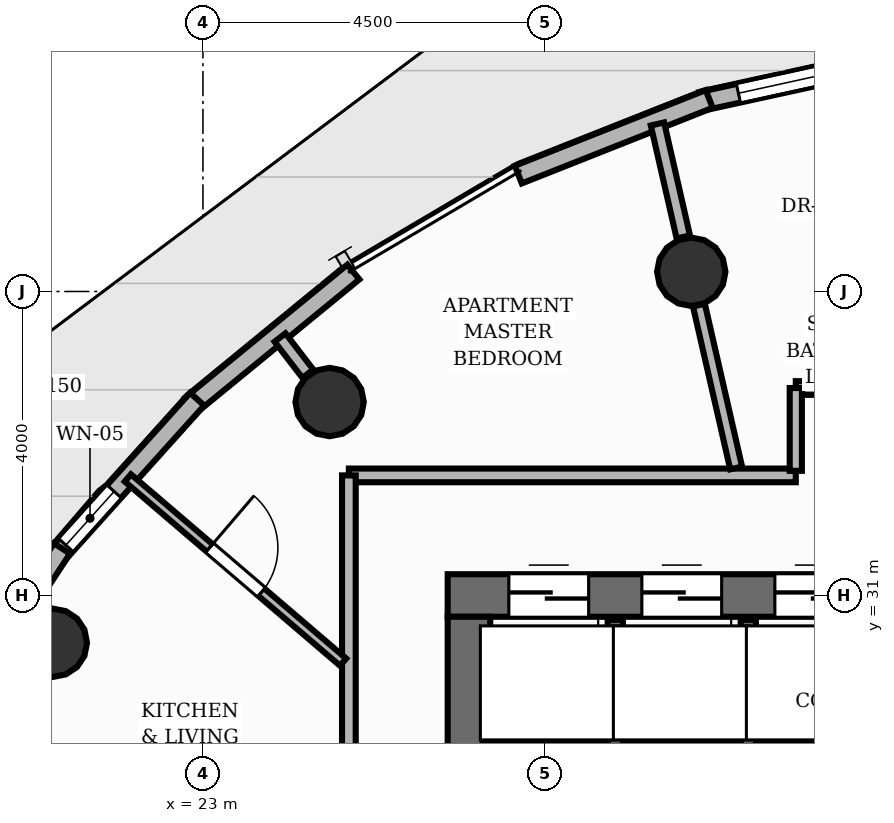
"""IFC4 building model, lengths in metres.
Left out: names, types, materials, properties, quantities, classifications, styles, units other than length and angle.
Written with IfcOpenShell. Run it as: python <this file> out.ifc"""

import sys

from ifc_helpers import new_model, si_unit, direction, frame, frame_2d, origin, origin_2d, place, context, subcontext, project, spatial, rectangle, circle, extrude, element, fill, save


model = new_model("IFC4")
c1 = context("Model", 3, precision=1e-05, world=origin(), true_north=direction((0.0, 1.0)))
c2 = subcontext(c1, "Body", "Model", "MODEL_VIEW")
j1 = project(units=[si_unit("LENGTHUNIT", "METRE"), si_unit("PLANEANGLEUNIT", "RADIAN")], contexts=[c1])
p1 = place(None, origin())
s1 = spatial("IfcSite", under=j1, at=p1, CompositionType="ELEMENT")
p2 = place(p1, origin())
s2 = spatial("IfcBuilding", under=s1, at=p2, CompositionType="ELEMENT")
p3 = place(p2, frame((0.0, 0.0, 179.04)))
s3 = spatial("IfcBuildingStorey", under=s2, at=p3, CompositionType="ELEMENT", Elevation=179.04)
p4 = place(p3, frame((26.22, 31.0, 0.0), z_axis=(0.0, 0.0, 1.0), x_axis=(1.0, 0.0, 0.0)))
e1 = element("IfcWall", 1, at=p4, inside=s3, PredefinedType="SHEAR", context=c2, shape_type="SweptSolid", body=[
    extrude(rectangle(XDim=11.56, YDim=0.56, at=frame_2d((5.78, 0.0))), origin(), (0.0, 0.0, 1.0), 3.2),
])
p5 = place(p4, frame((8.18, 0.0, 0.0)))
e2 = element("IfcOpeningElement", 2, at=p5, cuts=e1, PredefinedType="OPENING", context=c2, shape_type="SweptSolid", body=[
    extrude(rectangle(XDim=1.1, YDim=2.15, at=frame_2d((0.55, 1.075))), frame((0.0, 0.29, 0.0), z_axis=(0.0, -1.0, 0.0), x_axis=(1.0, 0.0, 0.0)), (0.0, 0.0, 1.0), 0.58),
])
p6 = place(p4, frame((0.805, 0.0, 0.0)))
e3 = element("IfcOpeningElement", 3, at=p6, cuts=e1, PredefinedType="OPENING", context=c2, shape_type="SweptSolid", body=[
    extrude(rectangle(XDim=1.05, YDim=2.15, at=frame_2d((0.525, 1.075))), frame((0.0, 0.29, 0.0), z_axis=(0.0, -1.0, 0.0), x_axis=(1.0, 0.0, 0.0)), (0.0, 0.0, 1.0), 0.58),
])
p7 = place(p4, frame((2.555, 0.0, 0.0)))
e4 = element("IfcOpeningElement", 4, at=p7, cuts=e1, PredefinedType="OPENING", context=c2, shape_type="SweptSolid", body=[
    extrude(rectangle(XDim=1.05, YDim=2.15, at=frame_2d((0.525, 1.075))), frame((0.0, 0.29, 0.0), z_axis=(0.0, -1.0, 0.0), x_axis=(1.0, 0.0, 0.0)), (0.0, 0.0, 1.0), 0.58),
])
p8 = place(p4, frame((4.305, 0.0, 0.0)))
e5 = element("IfcOpeningElement", 5, at=p8, cuts=e1, PredefinedType="OPENING", context=c2, shape_type="SweptSolid", body=[
    extrude(rectangle(XDim=1.05, YDim=2.15, at=frame_2d((0.525, 1.075))), frame((0.0, 0.29, 0.0), z_axis=(0.0, -1.0, 0.0), x_axis=(1.0, 0.0, 0.0)), (0.0, 0.0, 1.0), 0.58),
])
p9 = place(p3, frame((26.5, 17.28, 0.0), z_axis=(0.0, 0.0, 1.0), x_axis=(0.0, 1.0, 0.0)))
e6 = element("IfcWall", 6, at=p9, inside=s3, PredefinedType="SHEAR", context=c2, shape_type="SweptSolid", body=[
    extrude(rectangle(XDim=13.44, YDim=0.56, at=frame_2d((6.72, 0.0))), origin(), (0.0, 0.0, 1.0), 3.2),
])
for number, where, z_axis, x_axis in (
    (7, (29.425, 35.26, 0.0), (0.0, 0.0, 1.0), (1.0, 0.0, 0.0)),
    (8, (24.667, 33.545, 0.0), (0.0, 0.0, 1.0), (1.0, 0.0, 0.0)),
    (9, (21.025, 30.378, 0.0), (0.0, 0.0, 1.0), (1.0, 0.0, 0.0)),
):
    element("IfcColumn", number, at=place(p3, frame(where, z_axis=z_axis, x_axis=x_axis)), inside=s3, PredefinedType="COLUMN", context=c2, shape_type="SweptSolid", body=[
        extrude(circle(Radius=0.45, at=origin_2d()), origin(), (0.0, 0.0, 1.0), 3.2),
    ])
p10 = place(p3, frame((29.556, 37.501, 0.0), z_axis=(0.0, 0.0, 1.0), x_axis=(0.976886196324, 0.213760051067, 0.0)))
e10 = element("IfcWall", 10, at=p10, inside=s3, PredefinedType="SOLIDWALL", context=c2, shape_type="SweptSolid", body=[
    extrude(rectangle(XDim=2.651, YDim=0.25, at=frame_2d((1.325, 0.0))), origin(), (0.0, 0.0, 1.0), 2.96),
])
p11 = place(p10, frame((0.501, 0.0, 0.85)))
e11 = element("IfcOpeningElement", 11, at=p11, cuts=e10, PredefinedType="OPENING", context=c2, shape_type="SweptSolid", body=[
    extrude(rectangle(XDim=1.65, YDim=1.55, at=frame_2d((0.825, 0.775))), frame((0.0, 0.135, 0.0), z_axis=(0.0, -1.0, 0.0), x_axis=(1.0, 0.0, 0.0)), (0.0, 0.0, 1.0), 0.27),
])
p12 = place(p3, frame((27.149, 36.538, 0.0), z_axis=(0.0, 0.0, 1.0), x_axis=(0.929693178164, 0.368334894459, 0.0)))
e12 = element("IfcWall", 12, at=p12, inside=s3, PredefinedType="SOLIDWALL", context=c2, shape_type="SweptSolid", body=[
    extrude(rectangle(XDim=2.702, YDim=0.25, at=frame_2d((1.351, 0.0))), origin(), (0.0, 0.0, 1.0), 2.96),
])
p13 = place(p3, frame((22.845, 33.508, 0.0), z_axis=(0.0, 0.0, 1.0), x_axis=(0.773491700486, 0.633806428872, 0.0)))
e13 = element("IfcWall", 13, at=p13, inside=s3, PredefinedType="SOLIDWALL", context=c2, shape_type="SweptSolid", body=[
    extrude(rectangle(XDim=2.758, YDim=0.25, at=frame_2d((1.379, 0.0))), origin(), (0.0, 0.0, 1.0), 2.96),
])
p14 = place(p3, frame((21.079, 31.532, 0.0), z_axis=(0.0, 0.0, 1.0), x_axis=(0.668764193685, 0.743474581438, 0.0)))
e14 = element("IfcWall", 14, at=p14, inside=s3, PredefinedType="SOLIDWALL", context=c2, shape_type="SweptSolid", body=[
    extrude(rectangle(XDim=2.758, YDim=0.25, at=frame_2d((1.379, 0.0))), origin(), (0.0, 0.0, 1.0), 2.96),
])
p15 = place(p14, frame((0.175, 0.0, 0.85)))
e15 = element("IfcOpeningElement", 15, at=p15, cuts=e14, PredefinedType="OPENING", context=c2, shape_type="SweptSolid", body=[
    extrude(rectangle(XDim=0.95, YDim=1.45, at=frame_2d((0.475, 0.725))), frame((0.0, 0.135, 0.0), z_axis=(0.0, -1.0, 0.0), x_axis=(1.0, 0.0, 0.0)), (0.0, 0.0, 1.0), 0.27),
])
p16 = place(p3, frame((19.646, 29.327, 0.0), z_axis=(0.0, 0.0, 1.0), x_axis=(0.547664848596, 0.83669780304, 0.0)))
e16 = element("IfcWall", 16, at=p16, inside=s3, PredefinedType="SOLIDWALL", context=c2, shape_type="SweptSolid", body=[
    extrude(rectangle(XDim=2.739, YDim=0.25, at=frame_2d((1.369, 0.0))), origin(), (0.0, 0.0, 1.0), 2.96),
])
for number, where, z_axis, x_axis in (
    (17, (28.425, 29.02, 0.0), (0.0, 0.0, 1.0), (0.0, 1.0, 0.0)),
    (18, (30.175, 29.02, 0.0), (0.0, 0.0, 1.0), (0.0, 1.0, 0.0)),
):
    element("IfcWall", number, at=place(p3, frame(where, z_axis=z_axis, x_axis=x_axis)), inside=s3, PredefinedType="SHEAR", context=c2, shape_type="SweptSolid", body=[
        extrude(rectangle(XDim=1.66, YDim=0.2, at=frame_2d((0.83, 0.0))), origin(), (0.0, 0.0, 1.0), 3.2),
    ])
p17 = place(p3, frame((29.32, 35.718, 0.0), z_axis=(0.0, 0.0, 1.0), x_axis=(-0.222976920769, 0.974823723965, 0.0)))
e19 = element("IfcWall", 19, at=p17, inside=s3, PredefinedType="PARTITIONING", context=c2, shape_type="SweptSolid", body=[
    extrude(rectangle(XDim=1.525, YDim=0.18, at=frame_2d((0.763, 0.0))), origin(), (0.0, 0.0, 1.0), 2.403),
])
p18 = place(p3, frame((24.38, 33.918, 0.0), z_axis=(0.0, 0.0, 1.0), x_axis=(-0.609062571598, 0.793122174623, 0.0)))
e20 = element("IfcWall", 20, at=p18, inside=s3, PredefinedType="PARTITIONING", context=c2, shape_type="SweptSolid", body=[
    extrude(rectangle(XDim=0.601, YDim=0.18, at=frame_2d((0.3, 0.0))), origin(), (0.0, 0.0, 1.0), 2.403),
])
p19 = place(p3, frame((30.8, 33.73, 0.0), z_axis=(0.0, 0.0, 1.0), x_axis=(1.0, 0.0, 0.0)))
e21 = element("IfcWall", 21, at=p19, inside=s3, PredefinedType="PARTITIONING", context=c2, shape_type="SweptSolid", body=[
    extrude(rectangle(XDim=2.4, YDim=0.18, at=frame_2d((1.2, 0.0))), origin(), (0.0, 0.0, 1.0), 2.955),
])
p20 = place(p3, frame((24.92, 32.58, 0.0), z_axis=(0.0, 0.0, 1.0), x_axis=(1.0, 0.0, 0.0)))
e22 = element("IfcWall", 22, at=p20, inside=s3, PredefinedType="PARTITIONING", context=c2, shape_type="SweptSolid", body=[
    extrude(rectangle(XDim=5.88, YDim=0.18, at=frame_2d((2.94, 0.0))), origin(), (0.0, 0.0, 1.0), 2.955),
])
p21 = place(p3, frame((30.8, 32.64, 0.0), z_axis=(0.0, 0.0, 1.0), x_axis=(0.0, 1.0, 0.0)))
e23 = element("IfcWall", 23, at=p21, inside=s3, PredefinedType="PLUMBINGWALL", context=c2, shape_type="SweptSolid", body=[
    extrude(rectangle(XDim=1.09, YDim=0.16, at=frame_2d((0.545, 0.0))), origin(), (0.0, 0.0, 1.0), 2.955),
])
p22 = place(p3, frame((24.92, 19.449, 0.0), z_axis=(0.0, 0.0, 1.0), x_axis=(0.0, 1.0, 0.0)))
e24 = element("IfcWall", 24, at=p22, inside=s3, PredefinedType="PARTITIONING", context=c2, shape_type="SweptSolid", body=[
    extrude(rectangle(XDim=13.131, YDim=0.18, at=frame_2d((6.565, 0.0))), origin(), (0.0, 0.0, 1.0), 2.955),
])
p23 = place(p22, frame((7.897, 0.0, 0.0)))
e25 = element("IfcOpeningElement", 25, at=p23, cuts=e24, PredefinedType="OPENING", context=c2, shape_type="SweptSolid", body=[
    extrude(rectangle(XDim=1.05, YDim=2.15, at=frame_2d((0.525, 1.075))), frame((0.0, 0.1, 0.0), z_axis=(0.0, -1.0, 0.0), x_axis=(1.0, 0.0, 0.0)), (0.0, 0.0, 1.0), 0.2),
])
p24 = place(p3, frame((30.015, 32.677, 0.0), z_axis=(0.0, 0.0, 1.0), x_axis=(-0.222969522248, 0.974825416241, 0.0)))
e26 = element("IfcWall", 26, at=p24, inside=s3, PredefinedType="PLUMBINGWALL", context=c2, shape_type="SweptSolid", body=[
    extrude(rectangle(XDim=2.199, YDim=0.16, at=frame_2d((1.099, 0.0))), origin(), (0.0, 0.0, 1.0), 2.403),
])
p25 = place(p3, frame((22.012, 32.547, 0.0), z_axis=(0.0, 0.0, 1.0), x_axis=(0.759801913408, -0.650154637284, 0.0)))
e27 = element("IfcWall", 27, at=p25, inside=s3, PredefinedType="PARTITIONING", context=c2, shape_type="SweptSolid", body=[
    extrude(rectangle(XDim=3.727, YDim=0.125, at=frame_2d((1.864, 0.0))), origin(), (0.0, 0.0, 1.0), 2.955),
])
p26 = place(p25, frame((1.414, 0.0, 0.0)))
e28 = element("IfcOpeningElement", 28, at=p26, cuts=e27, PredefinedType="OPENING", context=c2, shape_type="SweptSolid", body=[
    extrude(rectangle(XDim=0.9, YDim=2.1, at=frame_2d((0.45, 1.05))), frame((0.0, 0.073, 0.0), z_axis=(0.0, -1.0, 0.0), x_axis=(1.0, 0.0, 0.0)), (0.0, 0.0, 1.0), 0.145),
])
p27 = place(p11, origin())
e29 = element("IfcWindow", 29, at=p27, inside=s3, PartitioningType="SINGLE_PANEL", PredefinedType="WINDOW", context=c2, shape_type="SweptSolid", body=[
    extrude(rectangle(XDim=1.65, YDim=1.55, at=frame_2d((0.825, 0.775))), frame((0.0, 0.03, 0.0), z_axis=(0.0, -1.0, 0.0), x_axis=(1.0, 0.0, 0.0)), (0.0, 0.0, 1.0), 0.06),
])
fill(e11, e29)
p28 = place(p15, origin())
e30 = element("IfcWindow", 30, at=p28, inside=s3, PartitioningType="SINGLE_PANEL", PredefinedType="WINDOW", context=c2, shape_type="SweptSolid", body=[
    extrude(rectangle(XDim=0.95, YDim=1.45, at=frame_2d((0.475, 0.725))), frame((0.0, 0.03, 0.0), z_axis=(0.0, -1.0, 0.0), x_axis=(1.0, 0.0, 0.0)), (0.0, 0.0, 1.0), 0.06),
])
fill(e15, e30)
p29 = place(p6, origin())
e31 = element("IfcDoor", 31, at=p29, inside=s3, OperationType="DOUBLE_DOOR_SLIDING", PredefinedType="DOOR", context=c2, shape_type="SweptSolid", body=[
    extrude(rectangle(XDim=1.05, YDim=2.15, at=frame_2d((0.525, 1.075))), frame((0.0, 0.025, 0.0), z_axis=(0.0, -1.0, 0.0), x_axis=(1.0, 0.0, 0.0)), (0.0, 0.0, 1.0), 0.05),
])
fill(e3, e31)
p30 = place(p7, origin())
e32 = element("IfcDoor", 32, at=p30, inside=s3, OperationType="DOUBLE_DOOR_SLIDING", PredefinedType="DOOR", context=c2, shape_type="SweptSolid", body=[
    extrude(rectangle(XDim=1.05, YDim=2.15, at=frame_2d((0.525, 1.075))), frame((0.0, 0.025, 0.0), z_axis=(0.0, -1.0, 0.0), x_axis=(1.0, 0.0, 0.0)), (0.0, 0.0, 1.0), 0.05),
])
fill(e4, e32)
p31 = place(p8, origin())
e33 = element("IfcDoor", 33, at=p31, inside=s3, OperationType="DOUBLE_DOOR_SLIDING", PredefinedType="DOOR", context=c2, shape_type="SweptSolid", body=[
    extrude(rectangle(XDim=1.05, YDim=2.15, at=frame_2d((0.525, 1.075))), frame((0.0, 0.025, 0.0), z_axis=(0.0, -1.0, 0.0), x_axis=(1.0, 0.0, 0.0)), (0.0, 0.0, 1.0), 0.05),
])
fill(e5, e33)
p32 = place(p26, origin())
e34 = element("IfcDoor", 34, at=p32, inside=s3, OperationType="SINGLE_SWING_LEFT", PredefinedType="DOOR", context=c2, shape_type="SweptSolid", body=[
    extrude(rectangle(XDim=0.9, YDim=2.1, at=frame_2d((0.45, 1.05))), frame((0.0, 0.025, 0.0), z_axis=(0.0, -1.0, 0.0), x_axis=(1.0, 0.0, 0.0)), (0.0, 0.0, 1.0), 0.05),
])
fill(e28, e34)
save(model, sys.argv[1])
